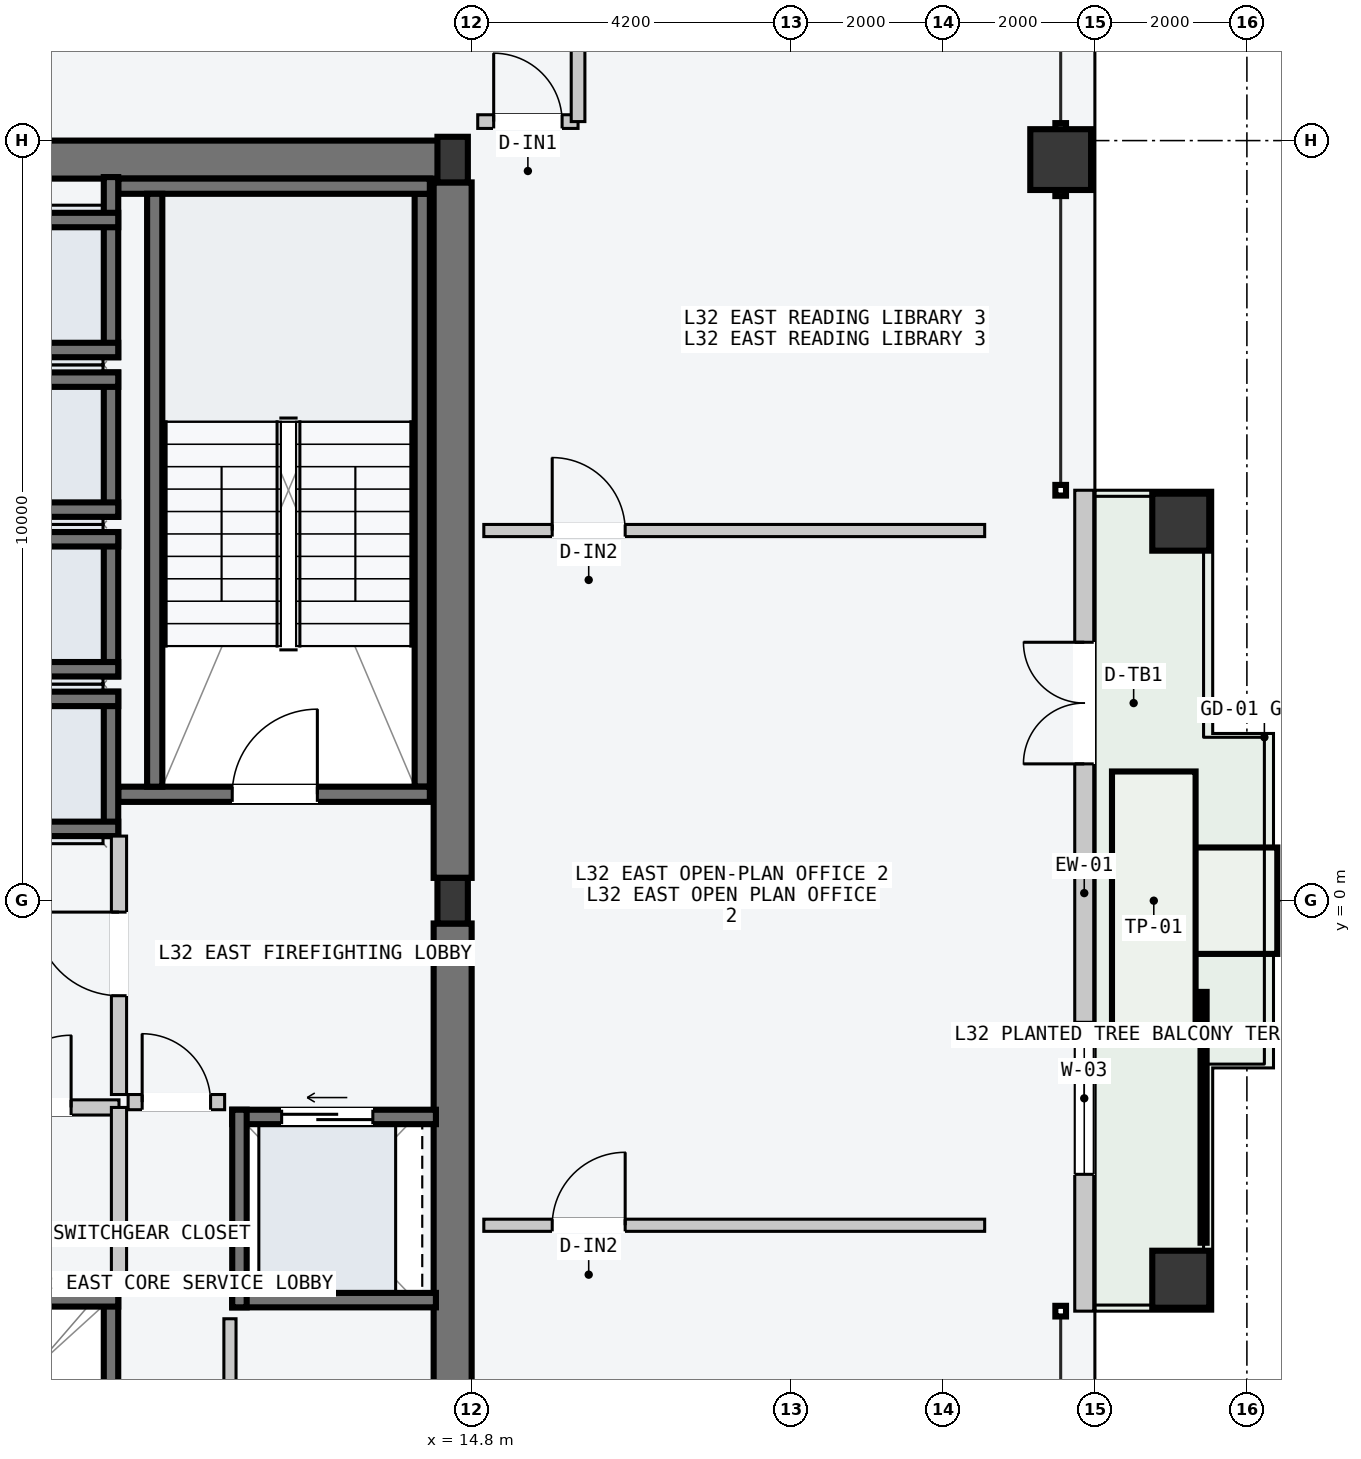
"""IFC4 building model, lengths in metres.
Left out: names, types, materials, properties, quantities, classifications, styles, units other than length and angle.
Written with IfcOpenShell. Run it as: python <this file> out.ifc"""

import sys

from ifc_helpers import new_model, si_unit, direction, frame, frame_2d, origin, origin_2d, place, context, subcontext, project, spatial, rectangle, hollow_rectangle, i_section, extrude, element, fill, save


model = new_model("IFC4")
c1 = context("Model", 3, precision=1e-05, world=origin(), true_north=direction((0.0, 1.0)))
c2 = subcontext(c1, "Body", "Model", "MODEL_VIEW")
j1 = project(units=[si_unit("LENGTHUNIT", "METRE"), si_unit("PLANEANGLEUNIT", "RADIAN")], contexts=[c1])
p1 = place(None, origin())
s1 = spatial("IfcSite", under=j1, at=p1, CompositionType="ELEMENT")
p2 = place(p1, origin())
s2 = spatial("IfcBuilding", under=s1, at=p2, CompositionType="ELEMENT")
p3 = place(p2, frame((0.0, 0.0, 124.2)))
s3 = spatial("IfcBuildingStorey", under=s2, at=p3, CompositionType="ELEMENT", Elevation=124.2)
p4 = place(p3, frame((8.07, 9.75, -0.2), z_axis=(0.0, 0.0, 1.0), x_axis=(1.0, 0.0, 0.0)))
e1 = element("IfcWall", 1, at=p4, inside=s3, PredefinedType="SHEAR", context=c2, shape_type="SweptSolid", body=[
    extrude(rectangle(XDim=6.46, YDim=0.5, at=frame_2d((3.23, 0.0))), origin(), (0.0, 0.0, 1.0), 3.6),
])
for number, where, z_axis, x_axis in (
    (2, (14.55, -9.45, -0.2), (0.0, 0.0, 1.0), (0.0, 1.0, 0.0)),
    (3, (14.55, 0.3, -0.2), (0.0, 0.0, 1.0), (0.0, 1.0, 0.0)),
):
    element("IfcWall", number, at=place(p3, frame(where, z_axis=z_axis, x_axis=x_axis)), inside=s3, PredefinedType="SHEAR", context=c2, shape_type="SweptSolid", body=[
        extrude(rectangle(XDim=9.15, YDim=0.5, at=frame_2d((4.575, 0.0))), origin(), (0.0, 0.0, 1.0), 3.6),
    ])
p5 = place(p3, frame((14.15, 1.5, -0.2), z_axis=(0.0, 0.0, 1.0), x_axis=(0.0, 1.0, 0.0)))
e4 = element("IfcWall", 4, at=p5, inside=s3, PredefinedType="SOLIDWALL", context=c2, shape_type="SweptSolid", body=[
    extrude(rectangle(XDim=7.8, YDim=0.2, at=frame_2d((3.9, 0.0))), origin(), (0.0, 0.0, 1.0), 3.6),
])
p6 = place(p3, frame((10.15, 1.4, -0.2), z_axis=(0.0, 0.0, 1.0), x_axis=(1.0, 0.0, 0.0)))
e5 = element("IfcWall", 5, at=p6, inside=s3, PredefinedType="SOLIDWALL", context=c2, shape_type="SweptSolid", body=[
    extrude(rectangle(XDim=4.1, YDim=0.2, at=frame_2d((2.05, 0.0))), origin(), (0.0, 0.0, 1.0), 3.6),
])
p7 = place(p6, frame((1.5, 0.0, 0.2)))
e6 = element("IfcOpeningElement", 6, at=p7, cuts=e5, PredefinedType="OPENING", context=c2, shape_type="SweptSolid", body=[
    extrude(rectangle(XDim=1.12, YDim=2.18, at=frame_2d((0.56, 1.09))), frame((0.0, 0.11, 0.0), z_axis=(0.0, -1.0, 0.0), x_axis=(1.0, 0.0, 0.0)), (0.0, 0.0, 1.0), 0.22),
])
p8 = place(p3, frame((10.15, 9.4, -0.2), z_axis=(0.0, 0.0, 1.0), x_axis=(1.0, 0.0, 0.0)))
e7 = element("IfcWall", 7, at=p8, inside=s3, PredefinedType="SOLIDWALL", context=c2, shape_type="SweptSolid", body=[
    extrude(rectangle(XDim=4.1, YDim=0.2, at=frame_2d((2.05, 0.0))), origin(), (0.0, 0.0, 1.0), 3.6),
])
p9 = place(p3, frame((10.63, 1.5, -0.2), z_axis=(0.0, 0.0, 1.0), x_axis=(0.0, 1.0, 0.0)))
e8 = element("IfcWall", 8, at=p9, inside=s3, PredefinedType="SOLIDWALL", context=c2, shape_type="SweptSolid", body=[
    extrude(rectangle(XDim=7.8, YDim=0.2, at=frame_2d((3.9, 0.0))), origin(), (0.0, 0.0, 1.0), 3.6),
])
for number, where, z_axis, x_axis in (
    (9, (14.55, 0.0, 0.0), (0.0, 0.0, 1.0), (1.0, 0.0, 0.0)),
    (10, (14.55, 9.75, 0.0), (0.0, 0.0, 1.0), (1.0, 0.0, 0.0)),
):
    element("IfcColumn", number, at=place(p3, frame(where, z_axis=z_axis, x_axis=x_axis)), inside=s3, PredefinedType="COLUMN", context=c2, shape_type="SweptSolid", body=[
        extrude(i_section(OverallWidth=0.4, OverallDepth=0.6, WebThickness=0.022, FlangeThickness=0.036, at=origin_2d()), origin(), (0.0, 0.0, 1.0), 3.6),
    ])
p10 = place(p3, frame((22.55, 9.75, 0.0), z_axis=(0.0, 0.0, 1.0), x_axis=(0.0, 1.0, 0.0)))
e11 = element("IfcColumn", 11, at=p10, inside=s3, PredefinedType="COLUMN", context=c2, shape_type="SweptSolid", body=[
    extrude(hollow_rectangle(XDim=0.8, YDim=0.8, WallThickness=0.036, at=origin_2d()), origin(), (0.0, 0.0, 1.0), 3.6),
])
for number, where, z_axis, x_axis in (
    (12, (24.13, -4.98, 0.0), (0.0, 0.0, 1.0), (0.0, 1.0, 0.0)),
    (13, (24.13, 4.98, 0.0), (0.0, 0.0, 1.0), (0.0, 1.0, 0.0)),
):
    element("IfcColumn", number, at=place(p3, frame(where, z_axis=z_axis, x_axis=x_axis)), inside=s3, PredefinedType="COLUMN", context=c2, shape_type="SweptSolid", body=[
        extrude(hollow_rectangle(XDim=0.75, YDim=0.75, WallThickness=0.032, at=origin_2d()), origin(), (0.0, 0.0, 1.0), 3.6),
    ])
p11 = place(p3, frame((22.86, -5.4, 0.0), z_axis=(0.0, 0.0, 1.0), x_axis=(0.0, 1.0, 0.0)))
e14 = element("IfcWall", 14, at=p11, inside=s3, PredefinedType="STANDARD", context=c2, shape_type="SweptSolid", body=[
    extrude(rectangle(XDim=10.8, YDim=0.25, at=frame_2d((5.4, 0.0))), origin(), (0.0, 0.0, 1.0), 3.4),
])
p12 = place(p11, frame((7.2, 0.0, 0.0)))
e15 = element("IfcOpeningElement", 15, at=p12, cuts=e14, PredefinedType="OPENING", context=c2, shape_type="SweptSolid", body=[
    extrude(rectangle(XDim=1.6, YDim=2.2, at=frame_2d((0.8, 1.1))), frame((0.0, 0.135, 0.0), z_axis=(0.0, -1.0, 0.0), x_axis=(1.0, 0.0, 0.0)), (0.0, 0.0, 1.0), 0.27),
])
p13 = place(p11, frame((1.8, 0.0, 0.85)))
e16 = element("IfcOpeningElement", 16, at=p13, cuts=e14, PredefinedType="OPENING", context=c2, shape_type="SweptSolid", body=[
    extrude(rectangle(XDim=2.0, YDim=2.1, at=frame_2d((1.0, 1.05))), frame((0.0, 0.135, 0.0), z_axis=(0.0, -1.0, 0.0), x_axis=(1.0, 0.0, 0.0)), (0.0, 0.0, 1.0), 0.27),
])
p14 = place(p3, frame((10.055, 0.85, -0.2), z_axis=(0.0, 0.0, 1.0), x_axis=(0.0, 1.0, 0.0)))
e17 = element("IfcWall", 17, at=p14, inside=s3, PredefinedType="SOLIDWALL", context=c2, shape_type="SweptSolid", body=[
    extrude(rectangle(XDim=1.9, YDim=0.19, at=frame_2d((0.95, 0.0))), origin(), (0.0, 0.0, 1.0), 3.6),
])
for number, where, z_axis, x_axis in (
    (18, (7.95, 2.655, -0.2), (0.0, 0.0, 1.0), (1.0, 0.0, 0.0)),
    (19, (7.95, 0.945, -0.2), (0.0, 0.0, 1.0), (1.0, 0.0, 0.0)),
):
    element("IfcWall", number, at=place(p3, frame(where, z_axis=z_axis, x_axis=x_axis)), inside=s3, PredefinedType="SOLIDWALL", context=c2, shape_type="SweptSolid", body=[
        extrude(rectangle(XDim=2.2, YDim=0.19, at=frame_2d((1.1, 0.0))), origin(), (0.0, 0.0, 1.0), 3.6),
    ])
p15 = place(p3, frame((10.055, 2.95, -0.2), z_axis=(0.0, 0.0, 1.0), x_axis=(0.0, 1.0, 0.0)))
e20 = element("IfcWall", 20, at=p15, inside=s3, PredefinedType="SOLIDWALL", context=c2, shape_type="SweptSolid", body=[
    extrude(rectangle(XDim=1.9, YDim=0.19, at=frame_2d((0.95, 0.0))), origin(), (0.0, 0.0, 1.0), 3.6),
])
for number, where, z_axis, x_axis in (
    (21, (7.95, 4.755, -0.2), (0.0, 0.0, 1.0), (1.0, 0.0, 0.0)),
    (22, (7.95, 3.045, -0.2), (0.0, 0.0, 1.0), (1.0, 0.0, 0.0)),
):
    element("IfcWall", number, at=place(p3, frame(where, z_axis=z_axis, x_axis=x_axis)), inside=s3, PredefinedType="SOLIDWALL", context=c2, shape_type="SweptSolid", body=[
        extrude(rectangle(XDim=2.2, YDim=0.19, at=frame_2d((1.1, 0.0))), origin(), (0.0, 0.0, 1.0), 3.6),
    ])
p16 = place(p3, frame((10.055, 5.05, -0.2), z_axis=(0.0, 0.0, 1.0), x_axis=(0.0, 1.0, 0.0)))
e23 = element("IfcWall", 23, at=p16, inside=s3, PredefinedType="SOLIDWALL", context=c2, shape_type="SweptSolid", body=[
    extrude(rectangle(XDim=1.9, YDim=0.19, at=frame_2d((0.95, 0.0))), origin(), (0.0, 0.0, 1.0), 3.6),
])
for number, where, z_axis, x_axis in (
    (24, (7.95, 6.855, -0.2), (0.0, 0.0, 1.0), (1.0, 0.0, 0.0)),
    (25, (7.95, 5.145, -0.2), (0.0, 0.0, 1.0), (1.0, 0.0, 0.0)),
):
    element("IfcWall", number, at=place(p3, frame(where, z_axis=z_axis, x_axis=x_axis)), inside=s3, PredefinedType="SOLIDWALL", context=c2, shape_type="SweptSolid", body=[
        extrude(rectangle(XDim=2.2, YDim=0.19, at=frame_2d((1.1, 0.0))), origin(), (0.0, 0.0, 1.0), 3.6),
    ])
p17 = place(p3, frame((10.055, 7.15, -0.2), z_axis=(0.0, 0.0, 1.0), x_axis=(0.0, 1.0, 0.0)))
e26 = element("IfcWall", 26, at=p17, inside=s3, PredefinedType="SOLIDWALL", context=c2, shape_type="SweptSolid", body=[
    extrude(rectangle(XDim=2.37, YDim=0.19, at=frame_2d((1.185, 0.0))), origin(), (0.0, 0.0, 1.0), 3.6),
])
for number, where, z_axis, x_axis in (
    (27, (7.95, 8.955, -0.2), (0.0, 0.0, 1.0), (1.0, 0.0, 0.0)),
    (28, (7.95, 7.245, -0.2), (0.0, 0.0, 1.0), (1.0, 0.0, 0.0)),
):
    element("IfcWall", number, at=place(p3, frame(where, z_axis=z_axis, x_axis=x_axis)), inside=s3, PredefinedType="SOLIDWALL", context=c2, shape_type="SweptSolid", body=[
        extrude(rectangle(XDim=2.2, YDim=0.19, at=frame_2d((1.1, 0.0))), origin(), (0.0, 0.0, 1.0), 3.6),
    ])
p18 = place(p3, frame((10.055, -7.15, -0.2), z_axis=(0.0, 0.0, 1.0), x_axis=(0.0, 1.0, 0.0)))
e29 = element("IfcWall", 29, at=p18, inside=s3, PredefinedType="SOLIDWALL", context=c2, shape_type="SweptSolid", body=[
    extrude(rectangle(XDim=2.0, YDim=0.19, at=frame_2d((1.0, 0.0))), origin(), (0.0, 0.0, 1.0), 3.6),
])
p19 = place(p3, frame((7.95, -5.245, -0.2), z_axis=(0.0, 0.0, 1.0), x_axis=(1.0, 0.0, 0.0)))
e30 = element("IfcWall", 30, at=p19, inside=s3, PredefinedType="SOLIDWALL", context=c2, shape_type="SweptSolid", body=[
    extrude(rectangle(XDim=2.2, YDim=0.19, at=frame_2d((1.1, 0.0))), origin(), (0.0, 0.0, 1.0), 3.6),
])
p20 = place(p3, frame((11.65, -2.845, -0.2), z_axis=(0.0, 0.0, 1.0), x_axis=(1.0, 0.0, 0.0)))
e31 = element("IfcWall", 31, at=p20, inside=s3, PredefinedType="SOLIDWALL", context=c2, shape_type="SweptSolid", body=[
    extrude(rectangle(XDim=2.68, YDim=0.19, at=frame_2d((1.34, 0.0))), origin(), (0.0, 0.0, 1.0), 3.6),
])
p21 = place(p20, frame((0.65, 0.0, 0.2)))
e32 = element("IfcOpeningElement", 32, at=p21, cuts=e31, PredefinedType="OPENING", context=c2, shape_type="SweptSolid", body=[
    extrude(rectangle(XDim=1.2, YDim=2.2, at=frame_2d((0.6, 1.1))), frame((0.0, 0.105, 0.0), z_axis=(0.0, -1.0, 0.0), x_axis=(1.0, 0.0, 0.0)), (0.0, 0.0, 1.0), 0.21),
])
p22 = place(p3, frame((11.65, -5.255, -0.2), z_axis=(0.0, 0.0, 1.0), x_axis=(1.0, 0.0, 0.0)))
e33 = element("IfcWall", 33, at=p22, inside=s3, PredefinedType="SOLIDWALL", context=c2, shape_type="SweptSolid", body=[
    extrude(rectangle(XDim=2.68, YDim=0.19, at=frame_2d((1.34, 0.0))), origin(), (0.0, 0.0, 1.0), 3.6),
])
p23 = place(p3, frame((11.745, -5.35, -0.2), z_axis=(0.0, 0.0, 1.0), x_axis=(0.0, 1.0, 0.0)))
e34 = element("IfcWall", 34, at=p23, inside=s3, PredefinedType="SOLIDWALL", context=c2, shape_type="SweptSolid", body=[
    extrude(rectangle(XDim=2.6, YDim=0.19, at=frame_2d((1.3, 0.0))), origin(), (0.0, 0.0, 1.0), 3.6),
])
p24 = place(p3, frame((10.16, -2.55, 0.0), z_axis=(0.0, 0.0, 1.0), x_axis=(0.0, 1.0, 0.0)))
e35 = element("IfcWall", 35, at=p24, inside=s3, PredefinedType="PARTITIONING", context=c2, shape_type="SweptSolid", body=[
    extrude(rectangle(XDim=3.4, YDim=0.2, at=frame_2d((1.7, 0.0))), origin(), (0.0, 0.0, 1.0), 3.4),
])
p25 = place(p24, frame((1.3, 0.0, 0.0)))
e36 = element("IfcOpeningElement", 36, at=p25, cuts=e35, PredefinedType="OPENING", context=c2, shape_type="SweptSolid", body=[
    extrude(rectangle(XDim=1.1, YDim=2.15, at=frame_2d((0.55, 1.075))), frame((0.0, 0.11, 0.0), z_axis=(0.0, -1.0, 0.0), x_axis=(1.0, 0.0, 0.0)), (0.0, 0.0, 1.0), 0.22),
])
p26 = place(p3, frame((10.28, -2.65, 0.0), z_axis=(0.0, 0.0, 1.0), x_axis=(1.0, 0.0, 0.0)))
e37 = element("IfcWall", 37, at=p26, inside=s3, PredefinedType="PARTITIONING", context=c2, shape_type="SweptSolid", body=[
    extrude(rectangle(XDim=1.27, YDim=0.2, at=frame_2d((0.635, 0.0))), origin(), (0.0, 0.0, 1.0), 3.4),
])
p27 = place(p26, frame((0.185, 0.0, 0.0)))
e38 = element("IfcOpeningElement", 38, at=p27, cuts=e37, PredefinedType="OPENING", context=c2, shape_type="SweptSolid", body=[
    extrude(rectangle(XDim=0.9, YDim=2.15, at=frame_2d((0.45, 1.075))), frame((0.0, 0.11, 0.0), z_axis=(0.0, -1.0, 0.0), x_axis=(1.0, 0.0, 0.0)), (0.0, 0.0, 1.0), 0.22),
])
p28 = place(p3, frame((7.96, -2.72, 0.0), z_axis=(0.0, 0.0, 1.0), x_axis=(1.0, 0.0, 0.0)))
e39 = element("IfcWall", 39, at=p28, inside=s3, PredefinedType="PARTITIONING", context=c2, shape_type="SweptSolid", body=[
    extrude(rectangle(XDim=2.2, YDim=0.2, at=frame_2d((1.1, 0.0))), origin(), (0.0, 0.0, 1.0), 3.4),
])
p29 = place(p28, frame((0.62, 0.0, 0.0)))
e40 = element("IfcOpeningElement", 40, at=p29, cuts=e39, PredefinedType="OPENING", context=c2, shape_type="SweptSolid", body=[
    extrude(rectangle(XDim=0.95, YDim=2.1, at=frame_2d((0.475, 1.05))), frame((0.0, 0.11, 0.0), z_axis=(0.0, -1.0, 0.0), x_axis=(1.0, 0.0, 0.0)), (0.0, 0.0, 1.0), 0.22),
])
p30 = place(p3, frame((10.16, -5.16, 0.0), z_axis=(0.0, 0.0, 1.0), x_axis=(0.0, 1.0, 0.0)))
e41 = element("IfcWall", 41, at=p30, inside=s3, PredefinedType="PARTITIONING", context=c2, shape_type="SweptSolid", body=[
    extrude(rectangle(XDim=2.44, YDim=0.2, at=frame_2d((1.22, 0.0))), origin(), (0.0, 0.0, 1.0), 3.4),
])
p31 = place(p3, frame((11.62, -9.35, 0.0), z_axis=(0.0, 0.0, 1.0), x_axis=(0.0, 1.0, 0.0)))
e42 = element("IfcWall", 42, at=p31, inside=s3, PredefinedType="PARTITIONING", context=c2, shape_type="SweptSolid", body=[
    extrude(rectangle(XDim=3.85, YDim=0.16, at=frame_2d((1.925, 0.0))), origin(), (0.0, 0.0, 1.0), 3.4),
])
p32 = place(p31, frame((1.475, 0.0, 0.0)))
e43 = element("IfcOpeningElement", 43, at=p32, cuts=e42, PredefinedType="OPENING", context=c2, shape_type="SweptSolid", body=[
    extrude(rectangle(XDim=0.9, YDim=2.15, at=frame_2d((0.45, 1.075))), frame((0.0, 0.09, 0.0), z_axis=(0.0, -1.0, 0.0), x_axis=(1.0, 0.0, 0.0)), (0.0, 0.0, 1.0), 0.18),
])
p33 = place(p3, frame((14.88, 10.25, 0.0), z_axis=(0.0, 0.0, 1.0), x_axis=(1.0, 0.0, 0.0)))
e44 = element("IfcWall", 44, at=p33, inside=s3, PredefinedType="PARTITIONING", context=c2, shape_type="SweptSolid", body=[
    extrude(rectangle(XDim=1.32, YDim=0.18, at=frame_2d((0.66, 0.0))), origin(), (0.0, 0.0, 1.0), 3.4),
])
p34 = place(p33, frame((0.21, 0.0, 0.0)))
e45 = element("IfcOpeningElement", 45, at=p34, cuts=e44, PredefinedType="OPENING", context=c2, shape_type="SweptSolid", body=[
    extrude(rectangle(XDim=0.9, YDim=2.15, at=frame_2d((0.45, 1.075))), frame((0.0, 0.1, 0.0), z_axis=(0.0, -1.0, 0.0), x_axis=(1.0, 0.0, 0.0)), (0.0, 0.0, 1.0), 0.2),
])
p35 = place(p3, frame((16.2, 10.25, 0.0), z_axis=(0.0, 0.0, 1.0), x_axis=(0.0, 1.0, 0.0)))
e46 = element("IfcWall", 46, at=p35, inside=s3, PredefinedType="PARTITIONING", context=c2, shape_type="SweptSolid", body=[
    extrude(rectangle(XDim=1.95, YDim=0.18, at=frame_2d((0.975, 0.0))), origin(), (0.0, 0.0, 1.0), 3.4),
])
p36 = place(p3, frame((14.96, -4.27, 0.0), z_axis=(0.0, 0.0, 1.0), x_axis=(1.0, 0.0, 0.0)))
e47 = element("IfcWall", 47, at=p36, inside=s3, PredefinedType="PARTITIONING", context=c2, shape_type="SweptSolid", body=[
    extrude(rectangle(XDim=6.59, YDim=0.16, at=frame_2d((3.295, 0.0))), origin(), (0.0, 0.0, 1.0), 3.4),
])
p37 = place(p36, frame((0.9, 0.0, 0.0)))
e48 = element("IfcOpeningElement", 48, at=p37, cuts=e47, PredefinedType="OPENING", context=c2, shape_type="SweptSolid", body=[
    extrude(rectangle(XDim=0.96, YDim=2.18, at=frame_2d((0.48, 1.09))), frame((0.0, 0.09, 0.0), z_axis=(0.0, -1.0, 0.0), x_axis=(1.0, 0.0, 0.0)), (0.0, 0.0, 1.0), 0.18),
])
p38 = place(p3, frame((14.96, 4.87, 0.0), z_axis=(0.0, 0.0, 1.0), x_axis=(1.0, 0.0, 0.0)))
e49 = element("IfcWall", 49, at=p38, inside=s3, PredefinedType="PARTITIONING", context=c2, shape_type="SweptSolid", body=[
    extrude(rectangle(XDim=6.59, YDim=0.16, at=frame_2d((3.295, 0.0))), origin(), (0.0, 0.0, 1.0), 3.4),
])
p39 = place(p38, frame((0.9, 0.0, 0.0)))
e50 = element("IfcOpeningElement", 50, at=p39, cuts=e49, PredefinedType="OPENING", context=c2, shape_type="SweptSolid", body=[
    extrude(rectangle(XDim=0.96, YDim=2.18, at=frame_2d((0.48, 1.09))), frame((0.0, 0.09, 0.0), z_axis=(0.0, -1.0, 0.0), x_axis=(1.0, 0.0, 0.0)), (0.0, 0.0, 1.0), 0.18),
])
p40 = place(p7, origin())
e51 = element("IfcDoor", 51, at=p40, inside=s3, OperationType="SINGLE_SWING_RIGHT", PredefinedType="DOOR", context=c2, shape_type="SweptSolid", body=[
    extrude(rectangle(XDim=1.12, YDim=2.18, at=frame_2d((0.56, 1.09))), frame((0.0, 0.025, 0.0), z_axis=(0.0, -1.0, 0.0), x_axis=(1.0, 0.0, 0.0)), (0.0, 0.0, 1.0), 0.05),
])
fill(e6, e51)
p41 = place(p12, origin())
e52 = element("IfcDoor", 52, at=p41, inside=s3, OperationType="DOUBLE_DOOR_SINGLE_SWING", PredefinedType="DOOR", context=c2, shape_type="SweptSolid", body=[
    extrude(rectangle(XDim=1.6, YDim=2.2, at=frame_2d((0.8, 1.1))), frame((0.0, 0.025, 0.0), z_axis=(0.0, -1.0, 0.0), x_axis=(1.0, 0.0, 0.0)), (0.0, 0.0, 1.0), 0.05),
])
fill(e15, e52)
p42 = place(p13, origin())
e53 = element("IfcWindow", 53, at=p42, inside=s3, PartitioningType="SINGLE_PANEL", PredefinedType="WINDOW", context=c2, shape_type="SweptSolid", body=[
    extrude(rectangle(XDim=2.0, YDim=2.1, at=frame_2d((1.0, 1.05))), frame((0.0, 0.03, 0.0), z_axis=(0.0, -1.0, 0.0), x_axis=(1.0, 0.0, 0.0)), (0.0, 0.0, 1.0), 0.06),
])
fill(e16, e53)
p43 = place(p21, origin())
e54 = element("IfcDoor", 54, at=p43, inside=s3, OperationType="SLIDING_TO_LEFT", PredefinedType="DOOR", context=c2, shape_type="SweptSolid", body=[
    extrude(rectangle(XDim=1.2, YDim=2.2, at=frame_2d((0.6, 1.1))), frame((0.0, 0.025, 0.0), z_axis=(0.0, -1.0, 0.0), x_axis=(1.0, 0.0, 0.0)), (0.0, 0.0, 1.0), 0.05),
])
fill(e32, e54)
p44 = place(p25, origin())
e55 = element("IfcDoor", 55, at=p44, inside=s3, OperationType="SINGLE_SWING_RIGHT", PredefinedType="DOOR", context=c2, shape_type="SweptSolid", body=[
    extrude(rectangle(XDim=1.1, YDim=2.15, at=frame_2d((0.55, 1.075))), frame((0.0, 0.025, 0.0), z_axis=(0.0, -1.0, 0.0), x_axis=(1.0, 0.0, 0.0)), (0.0, 0.0, 1.0), 0.05),
])
fill(e36, e55)
p45 = place(p27, origin())
e56 = element("IfcDoor", 56, at=p45, inside=s3, OperationType="SINGLE_SWING_LEFT", PredefinedType="DOOR", context=c2, shape_type="SweptSolid", body=[
    extrude(rectangle(XDim=0.9, YDim=2.15, at=frame_2d((0.45, 1.075))), frame((0.0, 0.025, 0.0), z_axis=(0.0, -1.0, 0.0), x_axis=(1.0, 0.0, 0.0)), (0.0, 0.0, 1.0), 0.05),
])
fill(e38, e56)
p46 = place(p29, origin())
e57 = element("IfcDoor", 57, at=p46, inside=s3, OperationType="SINGLE_SWING_RIGHT", PredefinedType="DOOR", context=c2, shape_type="SweptSolid", body=[
    extrude(rectangle(XDim=0.95, YDim=2.1, at=frame_2d((0.475, 1.05))), frame((0.0, 0.025, 0.0), z_axis=(0.0, -1.0, 0.0), x_axis=(1.0, 0.0, 0.0)), (0.0, 0.0, 1.0), 0.05),
])
fill(e40, e57)
p47 = place(p34, origin())
e58 = element("IfcDoor", 58, at=p47, inside=s3, OperationType="SINGLE_SWING_LEFT", PredefinedType="DOOR", context=c2, shape_type="SweptSolid", body=[
    extrude(rectangle(XDim=0.9, YDim=2.15, at=frame_2d((0.45, 1.075))), frame((0.0, 0.025, 0.0), z_axis=(0.0, -1.0, 0.0), x_axis=(1.0, 0.0, 0.0)), (0.0, 0.0, 1.0), 0.05),
])
fill(e45, e58)
p48 = place(p37, origin())
e59 = element("IfcDoor", 59, at=p48, inside=s3, OperationType="SINGLE_SWING_RIGHT", PredefinedType="DOOR", context=c2, shape_type="SweptSolid", body=[
    extrude(rectangle(XDim=0.96, YDim=2.18, at=frame_2d((0.48, 1.09))), frame((0.0, 0.025, 0.0), z_axis=(0.0, -1.0, 0.0), x_axis=(1.0, 0.0, 0.0)), (0.0, 0.0, 1.0), 0.05),
])
fill(e48, e59)
p49 = place(p39, origin())
e60 = element("IfcDoor", 60, at=p49, inside=s3, OperationType="SINGLE_SWING_LEFT", PredefinedType="DOOR", context=c2, shape_type="SweptSolid", body=[
    extrude(rectangle(XDim=0.96, YDim=2.18, at=frame_2d((0.48, 1.09))), frame((0.0, 0.025, 0.0), z_axis=(0.0, -1.0, 0.0), x_axis=(1.0, 0.0, 0.0)), (0.0, 0.0, 1.0), 0.05),
])
fill(e50, e60)
save(model, sys.argv[1])
